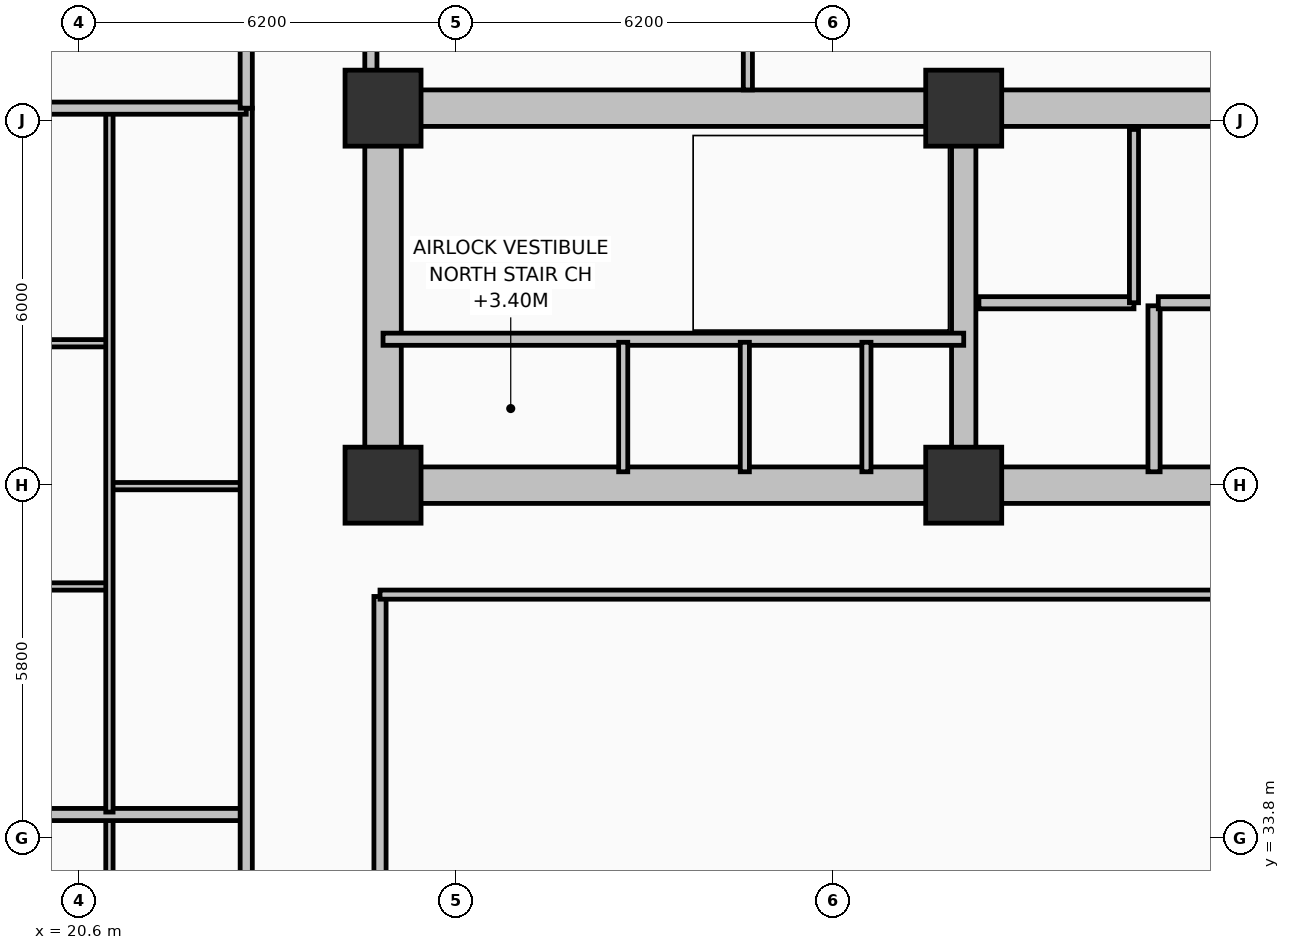
"""IFC4 building model, lengths in metres.
Left out: names, types, materials, properties, quantities, classifications, styles, units other than length and angle.
Written with IfcOpenShell. Run it as: python <this file> out.ifc"""

import sys

from ifc_helpers import new_model, si_unit, direction, frame, frame_2d, origin, origin_2d, place, context, subcontext, project, spatial, rectangle, extrude, element, fill, save


model = new_model("IFC4")
c1 = context("Model", 3, precision=1e-05, world=origin(), true_north=direction((0.0, 1.0)))
c2 = subcontext(c1, "Body", "Model", "MODEL_VIEW")
j1 = project(units=[si_unit("LENGTHUNIT", "METRE"), si_unit("PLANEANGLEUNIT", "RADIAN")], contexts=[c1])
p1 = place(None, origin())
s1 = spatial("IfcSite", under=j1, at=p1, CompositionType="ELEMENT")
p2 = place(p1, origin())
s2 = spatial("IfcBuilding", under=s1, at=p2, CompositionType="ELEMENT")
p3 = place(p2, frame((0.0, 0.0, 36.2)))
s3 = spatial("IfcBuildingStorey", under=s2, at=p3, CompositionType="ELEMENT", Elevation=36.2)
p4 = place(p3, frame((25.6, 45.8, 0.0), z_axis=(0.0, 0.0, 1.0), x_axis=(1.0, 0.0, 0.0)))
e1 = element("IfcWall", 1, at=p4, inside=s3, PredefinedType="SHEAR", context=c2, shape_type="SweptSolid", body=[
    extrude(rectangle(XDim=27.2, YDim=0.6, at=frame_2d((13.6, 0.0))), origin(), (0.0, 0.0, 1.0), 3.7),
])
p5 = place(p3, frame((25.6, 39.9, 0.0), z_axis=(0.0, 0.0, 1.0), x_axis=(0.0, 1.0, 0.0)))
e2 = element("IfcWall", 2, at=p5, inside=s3, PredefinedType="SHEAR", context=c2, shape_type="SweptSolid", body=[
    extrude(rectangle(XDim=5.6, YDim=0.6, at=frame_2d((2.8, 0.0))), origin(), (0.0, 0.0, 1.0), 3.7),
])
p6 = place(p3, frame((52.8, 39.6, 0.0), z_axis=(0.0, 0.0, 1.0), x_axis=(-1.0, 0.0, 0.0)))
e3 = element("IfcWall", 3, at=p6, inside=s3, PredefinedType="SHEAR", context=c2, shape_type="SweptSolid", body=[
    extrude(rectangle(XDim=27.2, YDim=0.6, at=frame_2d((13.6, 0.0))), origin(), (0.0, 0.0, 1.0), 3.7),
])
p7 = place(p6, frame((24.3, 0.0, 0.0)))
e4 = element("IfcOpeningElement", 4, at=p7, cuts=e3, PredefinedType="OPENING", context=c2, shape_type="SweptSolid", body=[
    extrude(rectangle(XDim=1.1, YDim=2.15, at=frame_2d((0.55, 1.075))), frame((0.0, 0.31, 0.0), z_axis=(0.0, -1.0, 0.0), x_axis=(1.0, 0.0, 0.0)), (0.0, 0.0, 1.0), 0.62),
])
p8 = place(p6, frame((21.85, 0.0, 0.0)))
e5 = element("IfcOpeningElement", 5, at=p8, cuts=e3, PredefinedType="OPENING", context=c2, shape_type="SweptSolid", body=[
    extrude(rectangle(XDim=0.85, YDim=2.1, at=frame_2d((0.425, 1.05))), frame((0.0, 0.31, 0.0), z_axis=(0.0, -1.0, 0.0), x_axis=(1.0, 0.0, 0.0)), (0.0, 0.0, 1.0), 0.62),
])
p9 = place(p6, frame((19.85, 0.0, 0.0)))
e6 = element("IfcOpeningElement", 6, at=p9, cuts=e3, PredefinedType="OPENING", context=c2, shape_type="SweptSolid", body=[
    extrude(rectangle(XDim=0.85, YDim=2.1, at=frame_2d((0.425, 1.05))), frame((0.0, 0.31, 0.0), z_axis=(0.0, -1.0, 0.0), x_axis=(1.0, 0.0, 0.0)), (0.0, 0.0, 1.0), 0.62),
])
p10 = place(p6, frame((15.1, 0.0, 0.0)))
e7 = element("IfcOpeningElement", 7, at=p10, cuts=e3, PredefinedType="OPENING", context=c2, shape_type="SweptSolid", body=[
    extrude(rectangle(XDim=1.2, YDim=2.15, at=frame_2d((0.6, 1.075))), frame((0.0, 0.31, 0.0), z_axis=(0.0, -1.0, 0.0), x_axis=(1.0, 0.0, 0.0)), (0.0, 0.0, 1.0), 0.62),
])
p11 = place(p6, frame((12.6, 0.0, 0.0)))
e8 = element("IfcOpeningElement", 8, at=p11, cuts=e3, PredefinedType="OPENING", context=c2, shape_type="SweptSolid", body=[
    extrude(rectangle(XDim=0.85, YDim=2.1, at=frame_2d((0.425, 1.05))), frame((0.0, 0.31, 0.0), z_axis=(0.0, -1.0, 0.0), x_axis=(1.0, 0.0, 0.0)), (0.0, 0.0, 1.0), 0.62),
])
p12 = place(p6, frame((10.85, 0.0, 0.0)))
e9 = element("IfcOpeningElement", 9, at=p12, cuts=e3, PredefinedType="OPENING", context=c2, shape_type="SweptSolid", body=[
    extrude(rectangle(XDim=0.85, YDim=2.1, at=frame_2d((0.425, 1.05))), frame((0.0, 0.31, 0.0), z_axis=(0.0, -1.0, 0.0), x_axis=(1.0, 0.0, 0.0)), (0.0, 0.0, 1.0), 0.62),
])
p13 = place(p6, frame((6.85, 0.0, 0.0)))
e10 = element("IfcOpeningElement", 10, at=p13, cuts=e3, PredefinedType="OPENING", context=c2, shape_type="SweptSolid", body=[
    extrude(rectangle(XDim=0.85, YDim=2.1, at=frame_2d((0.425, 1.05))), frame((0.0, 0.31, 0.0), z_axis=(0.0, -1.0, 0.0), x_axis=(1.0, 0.0, 0.0)), (0.0, 0.0, 1.0), 0.62),
])
p14 = place(p6, frame((2.0, 0.0, 0.0)))
e11 = element("IfcOpeningElement", 11, at=p14, cuts=e3, PredefinedType="OPENING", context=c2, shape_type="SweptSolid", body=[
    extrude(rectangle(XDim=0.85, YDim=2.1, at=frame_2d((0.425, 1.05))), frame((0.0, 0.31, 0.0), z_axis=(0.0, -1.0, 0.0), x_axis=(1.0, 0.0, 0.0)), (0.0, 0.0, 1.0), 0.62),
])
p15 = place(p3, frame((35.15, 39.9, 0.0), z_axis=(0.0, 0.0, 1.0), x_axis=(0.0, 1.0, 0.0)))
e12 = element("IfcWall", 12, at=p15, inside=s3, PredefinedType="SHEAR", context=c2, shape_type="SweptSolid", body=[
    extrude(rectangle(XDim=5.6, YDim=0.4, at=frame_2d((2.8, 0.0))), origin(), (0.0, 0.0, 1.0), 3.7),
])
for number, where, z_axis, x_axis in (
    (13, (25.6, 39.6, 0.0), (0.0, 0.0, 1.0), (1.0, 0.0, 0.0)),
    (14, (25.6, 45.8, 0.0), (0.0, 0.0, 1.0), (1.0, 0.0, 0.0)),
    (15, (35.15, 39.6, 0.0), (0.0, 0.0, 1.0), (1.0, 0.0, 0.0)),
    (16, (35.15, 45.8, 0.0), (0.0, 0.0, 1.0), (1.0, 0.0, 0.0)),
):
    element("IfcColumn", number, at=place(p3, frame(where, z_axis=z_axis, x_axis=x_axis)), inside=s3, PredefinedType="COLUMN", context=c2, shape_type="SweptSolid", body=[
        extrude(rectangle(XDim=1.25, YDim=1.25, at=origin_2d()), origin(), (0.0, 0.0, 1.0), 3.7),
    ])
p16 = place(p3, frame((35.15, 42.0, 0.0), z_axis=(0.0, 0.0, 1.0), x_axis=(-1.0, 0.0, 0.0)))
e17 = element("IfcWall", 17, at=p16, inside=s3, PredefinedType="SHEAR", context=c2, shape_type="SweptSolid", body=[
    extrude(rectangle(XDim=9.55, YDim=0.2, at=frame_2d((4.775, 0.0))), origin(), (0.0, 0.0, 1.0), 3.7),
])
p17 = place(p16, frame((7.25, 0.0, 0.0)))
e18 = element("IfcOpeningElement", 18, at=p17, cuts=e17, PredefinedType="OPENING", context=c2, shape_type="SweptSolid", body=[
    extrude(rectangle(XDim=1.1, YDim=2.15, at=frame_2d((0.55, 1.075))), frame((0.0, 0.11, 0.0), z_axis=(0.0, -1.0, 0.0), x_axis=(1.0, 0.0, 0.0)), (0.0, 0.0, 1.0), 0.22),
])
p18 = place(p3, frame((33.55, 39.82, 0.0), z_axis=(0.0, 0.0, 1.0), x_axis=(0.0, 1.0, 0.0)))
e19 = element("IfcWall", 19, at=p18, inside=s3, PredefinedType="PARTITIONING", context=c2, shape_type="SweptSolid", body=[
    extrude(rectangle(XDim=2.13, YDim=0.15, at=frame_2d((1.065, 0.0))), origin(), (0.0, 0.0, 1.0), 2.53),
])
p19 = place(p18, frame((0.55, 0.0, 0.0)))
e20 = element("IfcOpeningElement", 20, at=p19, cuts=e19, PredefinedType="OPENING", context=c2, shape_type="SweptSolid", body=[
    extrude(rectangle(XDim=0.85, YDim=2.05, at=frame_2d((0.425, 1.025))), frame((0.0, 0.085, 0.0), z_axis=(0.0, -1.0, 0.0), x_axis=(1.0, 0.0, 0.0)), (0.0, 0.0, 1.0), 0.17),
])
for number, where, z_axis, x_axis in (
    (21, (29.55, 39.82, 0.0), (0.0, 0.0, 1.0), (0.0, 1.0, 0.0)),
    (22, (31.55, 39.82, 0.0), (0.0, 0.0, 1.0), (0.0, 1.0, 0.0)),
):
    element("IfcWall", number, at=place(p3, frame(where, z_axis=z_axis, x_axis=x_axis)), inside=s3, PredefinedType="PARTITIONING", context=c2, shape_type="SweptSolid", body=[
        extrude(rectangle(XDim=2.13, YDim=0.15, at=frame_2d((1.065, 0.0))), origin(), (0.0, 0.0, 1.0), 2.53),
    ])
p20 = place(p3, frame((37.95, 42.6, 0.0), z_axis=(0.0, 0.0, 1.0), x_axis=(-1.0, 0.0, 0.0)))
e23 = element("IfcWall", 23, at=p20, inside=s3, PredefinedType="PARTITIONING", context=c2, shape_type="SweptSolid", body=[
    extrude(rectangle(XDim=2.55, YDim=0.2, at=frame_2d((1.275, 0.0))), origin(), (0.0, 0.0, 1.0), 2.3),
])
p21 = place(p20, frame((0.75, 0.0, 0.0)))
e24 = element("IfcOpeningElement", 24, at=p21, cuts=e23, PredefinedType="OPENING", context=c2, shape_type="SweptSolid", body=[
    extrude(rectangle(XDim=1.1, YDim=2.15, at=frame_2d((0.55, 1.075))), frame((0.0, 0.11, 0.0), z_axis=(0.0, -1.0, 0.0), x_axis=(1.0, 0.0, 0.0)), (0.0, 0.0, 1.0), 0.22),
])
p22 = place(p3, frame((37.95, 42.6, 0.0), z_axis=(0.0, 0.0, 1.0), x_axis=(0.0, 1.0, 0.0)))
e25 = element("IfcWall", 25, at=p22, inside=s3, PredefinedType="PARTITIONING", context=c2, shape_type="SweptSolid", body=[
    extrude(rectangle(XDim=2.85, YDim=0.15, at=frame_2d((1.425, 0.0))), origin(), (0.0, 0.0, 1.0), 2.53),
])
p23 = place(p3, frame((38.28, 39.82, 0.0), z_axis=(0.0, 0.0, 1.0), x_axis=(0.0, 1.0, 0.0)))
e26 = element("IfcWall", 26, at=p23, inside=s3, PredefinedType="PARTITIONING", context=c2, shape_type="SweptSolid", body=[
    extrude(rectangle(XDim=2.73, YDim=0.2, at=frame_2d((1.365, 0.0))), origin(), (0.0, 0.0, 1.0), 2.53),
])
p24 = place(p3, frame((42.95, 42.6, 0.0), z_axis=(0.0, 0.0, 1.0), x_axis=(-1.0, 0.0, 0.0)))
e27 = element("IfcWall", 27, at=p24, inside=s3, PredefinedType="PARTITIONING", context=c2, shape_type="SweptSolid", body=[
    extrude(rectangle(XDim=4.6, YDim=0.2, at=frame_2d((2.3, 0.0))), origin(), (0.0, 0.0, 1.0), 2.3),
])
p25 = place(p3, frame((25.55, 18.63, 0.0), z_axis=(0.0, 0.0, 1.0), x_axis=(0.0, 1.0, 0.0)))
e28 = element("IfcWall", 28, at=p25, inside=s3, PredefinedType="PARTITIONING", context=c2, shape_type="SweptSolid", body=[
    extrude(rectangle(XDim=19.14, YDim=0.2, at=frame_2d((9.57, 0.0))), origin(), (0.0, 0.0, 1.0), 2.53),
])
p26 = place(p3, frame((25.55, 37.8, 0.0), z_axis=(0.0, 0.0, 1.0), x_axis=(1.0, 0.0, 0.0)))
e29 = element("IfcWall", 29, at=p26, inside=s3, PredefinedType="PARTITIONING", context=c2, shape_type="SweptSolid", body=[
    extrude(rectangle(XDim=14.9, YDim=0.15, at=frame_2d((7.45, 0.0))), origin(), (0.0, 0.0, 1.0), 2.53),
])
p27 = place(p3, frame((21.1, 22.74, 0.0), z_axis=(0.0, 0.0, 1.0), x_axis=(0.0, 1.0, 0.0)))
e30 = element("IfcWall", 30, at=p27, inside=s3, PredefinedType="PARTITIONING", context=c2, shape_type="SweptSolid", body=[
    extrude(rectangle(XDim=11.404, YDim=0.12, at=frame_2d((5.702, 0.0))), origin(), (0.0, 0.0, 1.0), 2.53),
])
p28 = place(p27, frame((0.41, 0.0, 0.0)))
e31 = element("IfcOpeningElement", 31, at=p28, cuts=e30, PredefinedType="OPENING", context=c2, shape_type="SweptSolid", body=[
    extrude(rectangle(XDim=0.9, YDim=2.1, at=frame_2d((0.45, 1.05))), frame((0.0, 0.07, 0.0), z_axis=(0.0, -1.0, 0.0), x_axis=(1.0, 0.0, 0.0)), (0.0, 0.0, 1.0), 0.14),
])
p29 = place(p3, frame((14.57, 34.184, 0.0), z_axis=(0.0, 0.0, 1.0), x_axis=(1.0, 0.0, 0.0)))
e32 = element("IfcWall", 32, at=p29, inside=s3, PredefinedType="PARTITIONING", context=c2, shape_type="SweptSolid", body=[
    extrude(rectangle(XDim=8.78, YDim=0.2, at=frame_2d((4.39, 0.0))), origin(), (0.0, 0.0, 1.0), 2.53),
])
p30 = place(p3, frame((21.1, 39.584, 0.0), z_axis=(0.0, 0.0, 1.0), x_axis=(1.0, 0.0, 0.0)))
e33 = element("IfcWall", 33, at=p30, inside=s3, PredefinedType="PARTITIONING", context=c2, shape_type="SweptSolid", body=[
    extrude(rectangle(XDim=2.25, YDim=0.12, at=frame_2d((1.125, 0.0))), origin(), (0.0, 0.0, 1.0), 2.53),
])
p31 = place(p30, frame((0.6, 0.0, 0.0)))
e34 = element("IfcOpeningElement", 34, at=p31, cuts=e33, PredefinedType="OPENING", context=c2, shape_type="SweptSolid", body=[
    extrude(rectangle(XDim=0.85, YDim=2.1, at=frame_2d((0.425, 1.05))), frame((0.0, 0.07, 0.0), z_axis=(0.0, -1.0, 0.0), x_axis=(1.0, 0.0, 0.0)), (0.0, 0.0, 1.0), 0.14),
])
p32 = place(p3, frame((14.57, 37.934, 0.0), z_axis=(0.0, 0.0, 1.0), x_axis=(1.0, 0.0, 0.0)))
e35 = element("IfcWall", 35, at=p32, inside=s3, PredefinedType="PARTITIONING", context=c2, shape_type="SweptSolid", body=[
    extrude(rectangle(XDim=6.53, YDim=0.12, at=frame_2d((3.265, 0.0))), origin(), (0.0, 0.0, 1.0), 2.53),
])
p33 = place(p32, frame((5.18, 0.0, 0.0)))
e36 = element("IfcOpeningElement", 36, at=p33, cuts=e35, PredefinedType="OPENING", context=c2, shape_type="SweptSolid", body=[
    extrude(rectangle(XDim=0.9, YDim=2.1, at=frame_2d((0.45, 1.05))), frame((0.0, 0.07, 0.0), z_axis=(0.0, -1.0, 0.0), x_axis=(1.0, 0.0, 0.0)), (0.0, 0.0, 1.0), 0.14),
])
p34 = place(p3, frame((14.57, 41.934, 0.0), z_axis=(0.0, 0.0, 1.0), x_axis=(1.0, 0.0, 0.0)))
e37 = element("IfcWall", 37, at=p34, inside=s3, PredefinedType="PARTITIONING", context=c2, shape_type="SweptSolid", body=[
    extrude(rectangle(XDim=6.53, YDim=0.12, at=frame_2d((3.265, 0.0))), origin(), (0.0, 0.0, 1.0), 2.53),
])
p35 = place(p34, frame((5.18, 0.0, 0.0)))
e38 = element("IfcOpeningElement", 38, at=p35, cuts=e37, PredefinedType="OPENING", context=c2, shape_type="SweptSolid", body=[
    extrude(rectangle(XDim=0.9, YDim=2.1, at=frame_2d((0.45, 1.05))), frame((0.0, 0.07, 0.0), z_axis=(0.0, -1.0, 0.0), x_axis=(1.0, 0.0, 0.0)), (0.0, 0.0, 1.0), 0.14),
])
p36 = place(p3, frame((21.1, 34.224, 0.0), z_axis=(0.0, 0.0, 1.0), x_axis=(0.0, 1.0, 0.0)))
e39 = element("IfcWall", 39, at=p36, inside=s3, PredefinedType="PARTITIONING", context=c2, shape_type="SweptSolid", body=[
    extrude(rectangle(XDim=11.536, YDim=0.12, at=frame_2d((5.768, 0.0))), origin(), (0.0, 0.0, 1.0), 2.53),
])
p37 = place(p36, frame((0.41, 0.0, 0.0)))
e40 = element("IfcOpeningElement", 40, at=p37, cuts=e39, PredefinedType="OPENING", context=c2, shape_type="SweptSolid", body=[
    extrude(rectangle(XDim=0.9, YDim=2.1, at=frame_2d((0.45, 1.05))), frame((0.0, 0.07, 0.0), z_axis=(0.0, -1.0, 0.0), x_axis=(1.0, 0.0, 0.0)), (0.0, 0.0, 1.0), 0.14),
])
p38 = place(p3, frame((23.35, 10.6, 0.0), z_axis=(0.0, 0.0, 1.0), x_axis=(0.0, 1.0, 0.0)))
e41 = element("IfcWall", 41, at=p38, inside=s3, PredefinedType="PARTITIONING", context=c2, shape_type="SweptSolid", body=[
    extrude(rectangle(XDim=35.2, YDim=0.2, at=frame_2d((17.6, 0.0))), origin(), (0.0, 0.0, 1.0), 2.53),
])
p39 = place(p38, frame((2.65, 0.0, 0.0)))
e42 = element("IfcOpeningElement", 42, at=p39, cuts=e41, PredefinedType="OPENING", context=c2, shape_type="SweptSolid", body=[
    extrude(rectangle(XDim=1.0, YDim=2.15, at=frame_2d((0.5, 1.075))), frame((0.0, 0.11, 0.0), z_axis=(0.0, -1.0, 0.0), x_axis=(1.0, 0.0, 0.0)), (0.0, 0.0, 1.0), 0.22),
])
p40 = place(p38, frame((12.65, 0.0, 0.0)))
e43 = element("IfcOpeningElement", 43, at=p40, cuts=e41, PredefinedType="OPENING", context=c2, shape_type="SweptSolid", body=[
    extrude(rectangle(XDim=1.0, YDim=2.15, at=frame_2d((0.5, 1.075))), frame((0.0, 0.11, 0.0), z_axis=(0.0, -1.0, 0.0), x_axis=(1.0, 0.0, 0.0)), (0.0, 0.0, 1.0), 0.22),
])
p41 = place(p38, frame((24.134, 0.0, 0.0)))
e44 = element("IfcOpeningElement", 44, at=p41, cuts=e41, PredefinedType="OPENING", context=c2, shape_type="SweptSolid", body=[
    extrude(rectangle(XDim=1.0, YDim=2.15, at=frame_2d((0.5, 1.075))), frame((0.0, 0.11, 0.0), z_axis=(0.0, -1.0, 0.0), x_axis=(1.0, 0.0, 0.0)), (0.0, 0.0, 1.0), 0.22),
])
p42 = place(p3, frame((14.99, 45.8, 0.0), z_axis=(0.0, 0.0, 1.0), x_axis=(1.0, 0.0, 0.0)))
e45 = element("IfcWall", 45, at=p42, inside=s3, PredefinedType="PARTITIONING", context=c2, shape_type="SweptSolid", body=[
    extrude(rectangle(XDim=8.36, YDim=0.2, at=frame_2d((4.18, 0.0))), origin(), (0.0, 0.0, 1.0), 2.53),
])
p43 = place(p3, frame((23.35, 45.8, 0.0), z_axis=(0.0, 0.0, 1.0), x_axis=(0.0, 1.0, 0.0)))
e46 = element("IfcWall", 46, at=p43, inside=s3, PredefinedType="PARTITIONING", context=c2, shape_type="SweptSolid", body=[
    extrude(rectangle(XDim=5.63, YDim=0.2, at=frame_2d((2.815, 0.0))), origin(), (0.0, 0.0, 1.0), 2.53),
])
p44 = place(p3, frame((31.6, 46.1, 0.0), z_axis=(0.0, 0.0, 1.0), x_axis=(0.0, 1.0, 0.0)))
e47 = element("IfcWall", 47, at=p44, inside=s3, PredefinedType="PARTITIONING", context=c2, shape_type="SweptSolid", body=[
    extrude(rectangle(XDim=5.33, YDim=0.15, at=frame_2d((2.665, 0.0))), origin(), (0.0, 0.0, 1.0), 2.53),
])
p45 = place(p44, frame((0.85, 0.0, 0.0)))
e48 = element("IfcOpeningElement", 48, at=p45, cuts=e47, PredefinedType="OPENING", context=c2, shape_type="SweptSolid", body=[
    extrude(rectangle(XDim=0.9, YDim=2.1, at=frame_2d((0.45, 1.05))), frame((0.0, 0.085, 0.0), z_axis=(0.0, -1.0, 0.0), x_axis=(1.0, 0.0, 0.0)), (0.0, 0.0, 1.0), 0.17),
])
p46 = place(p3, frame((25.4, 46.1, 0.0), z_axis=(0.0, 0.0, 1.0), x_axis=(0.0, 1.0, 0.0)))
e49 = element("IfcWall", 49, at=p46, inside=s3, PredefinedType="PARTITIONING", context=c2, shape_type="SweptSolid", body=[
    extrude(rectangle(XDim=4.38, YDim=0.2, at=frame_2d((2.19, 0.0))), origin(), (0.0, 0.0, 1.0), 2.53),
])
p47 = place(p46, frame((1.05, 0.0, 0.0)))
e50 = element("IfcOpeningElement", 50, at=p47, cuts=e49, PredefinedType="OPENING", context=c2, shape_type="SweptSolid", body=[
    extrude(rectangle(XDim=0.9, YDim=2.1, at=frame_2d((0.45, 1.05))), frame((0.0, 0.11, 0.0), z_axis=(0.0, -1.0, 0.0), x_axis=(1.0, 0.0, 0.0)), (0.0, 0.0, 1.0), 0.22),
])
p48 = place(p17, origin())
e51 = element("IfcDoor", 51, at=p48, inside=s3, OperationType="SINGLE_SWING_RIGHT", PredefinedType="DOOR", context=c2, shape_type="SweptSolid", body=[
    extrude(rectangle(XDim=1.1, YDim=2.15, at=frame_2d((0.55, 1.075))), frame((0.0, 0.025, 0.0), z_axis=(0.0, -1.0, 0.0), x_axis=(1.0, 0.0, 0.0)), (0.0, 0.0, 1.0), 0.05),
])
fill(e18, e51)
p49 = place(p19, origin())
e52 = element("IfcDoor", 52, at=p49, inside=s3, OperationType="SINGLE_SWING_LEFT", PredefinedType="TRAPDOOR", context=c2, shape_type="SweptSolid", body=[
    extrude(rectangle(XDim=0.85, YDim=2.05, at=frame_2d((0.425, 1.025))), frame((0.0, 0.025, 0.0), z_axis=(0.0, -1.0, 0.0), x_axis=(1.0, 0.0, 0.0)), (0.0, 0.0, 1.0), 0.05),
])
fill(e20, e52)
p50 = place(p21, origin())
e53 = element("IfcDoor", 53, at=p50, inside=s3, OperationType="SLIDING_TO_LEFT", PredefinedType="DOOR", context=c2, shape_type="SweptSolid", body=[
    extrude(rectangle(XDim=1.1, YDim=2.15, at=frame_2d((0.55, 1.075))), frame((0.0, 0.025, 0.0), z_axis=(0.0, -1.0, 0.0), x_axis=(1.0, 0.0, 0.0)), (0.0, 0.0, 1.0), 0.05),
])
fill(e24, e53)
p51 = place(p31, origin())
e54 = element("IfcDoor", 54, at=p51, inside=s3, OperationType="SINGLE_SWING_LEFT", PredefinedType="DOOR", context=c2, shape_type="SweptSolid", body=[
    extrude(rectangle(XDim=0.85, YDim=2.1, at=frame_2d((0.425, 1.05))), frame((0.0, 0.025, 0.0), z_axis=(0.0, -1.0, 0.0), x_axis=(1.0, 0.0, 0.0)), (0.0, 0.0, 1.0), 0.05),
])
fill(e34, e54)
p52 = place(p33, origin())
e55 = element("IfcDoor", 55, at=p52, inside=s3, OperationType="SINGLE_SWING_LEFT", PredefinedType="DOOR", context=c2, shape_type="SweptSolid", body=[
    extrude(rectangle(XDim=0.9, YDim=2.1, at=frame_2d((0.45, 1.05))), frame((0.0, 0.025, 0.0), z_axis=(0.0, -1.0, 0.0), x_axis=(1.0, 0.0, 0.0)), (0.0, 0.0, 1.0), 0.05),
])
fill(e36, e55)
p53 = place(p35, origin())
e56 = element("IfcDoor", 56, at=p53, inside=s3, OperationType="SINGLE_SWING_RIGHT", PredefinedType="DOOR", context=c2, shape_type="SweptSolid", body=[
    extrude(rectangle(XDim=0.9, YDim=2.1, at=frame_2d((0.45, 1.05))), frame((0.0, 0.025, 0.0), z_axis=(0.0, -1.0, 0.0), x_axis=(1.0, 0.0, 0.0)), (0.0, 0.0, 1.0), 0.05),
])
fill(e38, e56)
p54 = place(p37, origin())
e57 = element("IfcDoor", 57, at=p54, inside=s3, OperationType="SINGLE_SWING_RIGHT", PredefinedType="DOOR", context=c2, shape_type="SweptSolid", body=[
    extrude(rectangle(XDim=0.9, YDim=2.1, at=frame_2d((0.45, 1.05))), frame((0.0, 0.025, 0.0), z_axis=(0.0, -1.0, 0.0), x_axis=(1.0, 0.0, 0.0)), (0.0, 0.0, 1.0), 0.05),
])
fill(e40, e57)
p55 = place(p41, origin())
e58 = element("IfcDoor", 58, at=p55, inside=s3, OperationType="SINGLE_SWING_LEFT", PredefinedType="DOOR", context=c2, shape_type="SweptSolid", body=[
    extrude(rectangle(XDim=1.0, YDim=2.15, at=frame_2d((0.5, 1.075))), frame((0.0, 0.025, 0.0), z_axis=(0.0, -1.0, 0.0), x_axis=(1.0, 0.0, 0.0)), (0.0, 0.0, 1.0), 0.05),
])
fill(e44, e58)
p56 = place(p7, origin())
e59 = element("IfcDoor", 59, at=p56, inside=s3, OperationType="SINGLE_SWING_LEFT", PredefinedType="DOOR", context=c2, shape_type="SweptSolid", body=[
    extrude(rectangle(XDim=1.1, YDim=2.15, at=frame_2d((0.55, 1.075))), frame((0.0, 0.025, 0.0), z_axis=(0.0, -1.0, 0.0), x_axis=(1.0, 0.0, 0.0)), (0.0, 0.0, 1.0), 0.05),
])
fill(e4, e59)
p57 = place(p8, origin())
e60 = element("IfcDoor", 60, at=p57, inside=s3, OperationType="SINGLE_SWING_RIGHT", PredefinedType="DOOR", context=c2, shape_type="SweptSolid", body=[
    extrude(rectangle(XDim=0.85, YDim=2.1, at=frame_2d((0.425, 1.05))), frame((0.0, 0.025, 0.0), z_axis=(0.0, -1.0, 0.0), x_axis=(1.0, 0.0, 0.0)), (0.0, 0.0, 1.0), 0.05),
])
fill(e5, e60)
p58 = place(p9, origin())
e61 = element("IfcDoor", 61, at=p58, inside=s3, OperationType="SINGLE_SWING_LEFT", PredefinedType="DOOR", context=c2, shape_type="SweptSolid", body=[
    extrude(rectangle(XDim=0.85, YDim=2.1, at=frame_2d((0.425, 1.05))), frame((0.0, 0.025, 0.0), z_axis=(0.0, -1.0, 0.0), x_axis=(1.0, 0.0, 0.0)), (0.0, 0.0, 1.0), 0.05),
])
fill(e6, e61)
p59 = place(p10, origin())
e62 = element("IfcDoor", 62, at=p59, inside=s3, OperationType="SINGLE_SWING_RIGHT", PredefinedType="DOOR", context=c2, shape_type="SweptSolid", body=[
    extrude(rectangle(XDim=1.2, YDim=2.15, at=frame_2d((0.6, 1.075))), frame((0.0, 0.025, 0.0), z_axis=(0.0, -1.0, 0.0), x_axis=(1.0, 0.0, 0.0)), (0.0, 0.0, 1.0), 0.05),
])
fill(e7, e62)
save(model, sys.argv[1])
